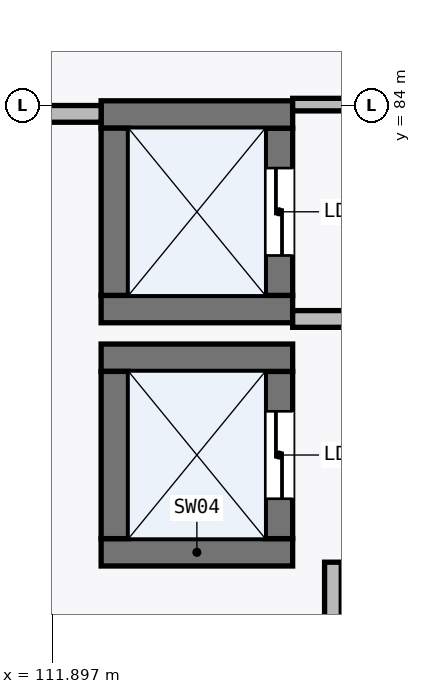
"""IFC4 building model, lengths in metres.
Left out: names, types, materials, properties, quantities, classifications, styles, units other than length and angle.
Written with IfcOpenShell. Run it as: python <this file> out.ifc"""

import sys

from ifc_helpers import new_model, si_unit, direction, frame, frame_2d, origin, place, context, subcontext, project, spatial, rectangle, extrude, element, fill, save


model = new_model("IFC4")
c1 = context("Model", 3, precision=1e-05, world=origin(), true_north=direction((0.0, 1.0)))
c2 = subcontext(c1, "Body", "Model", "MODEL_VIEW")
j1 = project(units=[si_unit("LENGTHUNIT", "METRE"), si_unit("PLANEANGLEUNIT", "RADIAN")], contexts=[c1])
p1 = place(None, origin())
s1 = spatial("IfcSite", under=j1, at=p1, CompositionType="ELEMENT")
p2 = place(p1, origin())
s2 = spatial("IfcBuilding", under=s1, at=p2, CompositionType="ELEMENT")
p3 = place(p2, frame((0.0, 0.0, -5.4)))
s3 = spatial("IfcBuildingStorey", under=s2, at=p3, CompositionType="ELEMENT", Elevation=-5.4)
p4 = place(p3, frame((112.54, 78.12, 0.0), z_axis=(0.0, 0.0, 1.0), x_axis=(1.0, 0.0, 0.0)))
e1 = element("IfcWall", 1, at=p4, inside=s3, PredefinedType="SHEAR", context=c2, shape_type="SweptSolid", body=[
    extrude(rectangle(XDim=2.52, YDim=0.36, at=frame_2d((1.26, 0.0))), origin(), (0.0, 0.0, 1.0), 5.145),
])
p5 = place(p3, frame((114.88, 78.3, 0.0), z_axis=(0.0, 0.0, 1.0), x_axis=(0.0, 1.0, 0.0)))
e2 = element("IfcWall", 2, at=p5, inside=s3, PredefinedType="SHEAR", context=c2, shape_type="SweptSolid", body=[
    extrude(rectangle(XDim=2.2, YDim=0.36, at=frame_2d((1.1, 0.0))), origin(), (0.0, 0.0, 1.0), 5.145),
])
p6 = place(p5, frame((0.525, 0.0, 0.0)))
e3 = element("IfcOpeningElement", 3, at=p6, cuts=e2, PredefinedType="OPENING", context=c2, shape_type="SweptSolid", body=[
    extrude(rectangle(XDim=1.15, YDim=2.2, at=frame_2d((0.575, 1.1))), frame((0.0, 0.19, 0.0), z_axis=(0.0, -1.0, 0.0), x_axis=(1.0, 0.0, 0.0)), (0.0, 0.0, 1.0), 0.38),
])
p7 = place(p3, frame((115.06, 80.68, 0.0), z_axis=(0.0, 0.0, 1.0), x_axis=(-1.0, 0.0, 0.0)))
e4 = element("IfcWall", 4, at=p7, inside=s3, PredefinedType="SHEAR", context=c2, shape_type="SweptSolid", body=[
    extrude(rectangle(XDim=2.52, YDim=0.36, at=frame_2d((1.26, 0.0))), origin(), (0.0, 0.0, 1.0), 5.145),
])
p8 = place(p3, frame((112.72, 80.5, 0.0), z_axis=(0.0, 0.0, 1.0), x_axis=(0.0, -1.0, 0.0)))
e5 = element("IfcWall", 5, at=p8, inside=s3, PredefinedType="SHEAR", context=c2, shape_type="SweptSolid", body=[
    extrude(rectangle(XDim=2.2, YDim=0.36, at=frame_2d((1.1, 0.0))), origin(), (0.0, 0.0, 1.0), 5.145),
])
p9 = place(p3, frame((112.54, 81.32, 0.0), z_axis=(0.0, 0.0, 1.0), x_axis=(1.0, 0.0, 0.0)))
e6 = element("IfcWall", 6, at=p9, inside=s3, PredefinedType="SHEAR", context=c2, shape_type="SweptSolid", body=[
    extrude(rectangle(XDim=2.52, YDim=0.36, at=frame_2d((1.26, 0.0))), origin(), (0.0, 0.0, 1.0), 5.145),
])
p10 = place(p3, frame((114.88, 81.5, 0.0), z_axis=(0.0, 0.0, 1.0), x_axis=(0.0, 1.0, 0.0)))
e7 = element("IfcWall", 7, at=p10, inside=s3, PredefinedType="SHEAR", context=c2, shape_type="SweptSolid", body=[
    extrude(rectangle(XDim=2.2, YDim=0.36, at=frame_2d((1.1, 0.0))), origin(), (0.0, 0.0, 1.0), 5.145),
])
p11 = place(p10, frame((0.525, 0.0, 0.0)))
e8 = element("IfcOpeningElement", 8, at=p11, cuts=e7, PredefinedType="OPENING", context=c2, shape_type="SweptSolid", body=[
    extrude(rectangle(XDim=1.15, YDim=2.2, at=frame_2d((0.575, 1.1))), frame((0.0, 0.19, 0.0), z_axis=(0.0, -1.0, 0.0), x_axis=(1.0, 0.0, 0.0)), (0.0, 0.0, 1.0), 0.38),
])
p12 = place(p3, frame((115.06, 83.88, 0.0), z_axis=(0.0, 0.0, 1.0), x_axis=(-1.0, 0.0, 0.0)))
e9 = element("IfcWall", 9, at=p12, inside=s3, PredefinedType="SHEAR", context=c2, shape_type="SweptSolid", body=[
    extrude(rectangle(XDim=2.52, YDim=0.36, at=frame_2d((1.26, 0.0))), origin(), (0.0, 0.0, 1.0), 5.145),
])
p13 = place(p3, frame((112.72, 83.7, 0.0), z_axis=(0.0, 0.0, 1.0), x_axis=(0.0, -1.0, 0.0)))
e10 = element("IfcWall", 10, at=p13, inside=s3, PredefinedType="SHEAR", context=c2, shape_type="SweptSolid", body=[
    extrude(rectangle(XDim=2.2, YDim=0.36, at=frame_2d((1.1, 0.0))), origin(), (0.0, 0.0, 1.0), 5.145),
])
p14 = place(p3, frame((112.54, 83.888, 0.0), z_axis=(0.0, 0.0, 1.0), x_axis=(-1.0, 0.0, 0.0)))
e11 = element("IfcWall", 11, at=p14, inside=s3, PredefinedType="PARTITIONING", context=c2, shape_type="SweptSolid", body=[
    extrude(rectangle(XDim=3.19, YDim=0.22, at=frame_2d((1.595, 0.0))), origin(), (0.0, 0.0, 1.0), 4.422),
])
p15 = place(p3, frame((115.59, 76.1, 0.0), z_axis=(0.0, 0.0, 1.0), x_axis=(0.0, 1.0, 0.0)))
e12 = element("IfcWall", 12, at=p15, inside=s3, PredefinedType="PARTITIONING", context=c2, shape_type="SweptSolid", body=[
    extrude(rectangle(XDim=1.89, YDim=0.22, at=frame_2d((0.945, 0.0))), origin(), (0.0, 0.0, 1.0), 5.145),
])
p16 = place(p3, frame((115.99, 81.19, 0.0), z_axis=(0.0, 0.0, 1.0), x_axis=(-1.0, 0.0, 0.0)))
e13 = element("IfcWall", 13, at=p16, inside=s3, PredefinedType="PARTITIONING", context=c2, shape_type="SweptSolid", body=[
    extrude(rectangle(XDim=0.93, YDim=0.22, at=frame_2d((0.465, 0.0))), origin(), (0.0, 0.0, 1.0), 5.145),
])
p17 = place(p3, frame((115.06, 84.01, 0.0), z_axis=(0.0, 0.0, 1.0), x_axis=(1.0, 0.0, 0.0)))
e14 = element("IfcWall", 14, at=p17, inside=s3, PredefinedType="PARTITIONING", context=c2, shape_type="SweptSolid", body=[
    extrude(rectangle(XDim=0.93, YDim=0.165, at=frame_2d((0.465, 0.0))), origin(), (0.0, 0.0, 1.0), 4.422),
])
p18 = place(p6, frame((1.15, 0.0, 0.0), z_axis=(0.0, 0.0, 1.0), x_axis=(-1.0, 0.0, 0.0)))
e15 = element("IfcDoor", 15, at=p18, inside=s3, OperationType="DOUBLE_DOOR_SLIDING", PredefinedType="DOOR", context=c2, shape_type="SweptSolid", body=[
    extrude(rectangle(XDim=1.15, YDim=2.2, at=frame_2d((0.575, 1.1))), frame((0.0, 0.025, 0.0), z_axis=(0.0, -1.0, 0.0), x_axis=(1.0, 0.0, 0.0)), (0.0, 0.0, 1.0), 0.05),
])
fill(e3, e15)
p19 = place(p11, frame((1.15, 0.0, 0.0), z_axis=(0.0, 0.0, 1.0), x_axis=(-1.0, 0.0, 0.0)))
e16 = element("IfcDoor", 16, at=p19, inside=s3, OperationType="DOUBLE_DOOR_SLIDING", PredefinedType="DOOR", context=c2, shape_type="SweptSolid", body=[
    extrude(rectangle(XDim=1.15, YDim=2.2, at=frame_2d((0.575, 1.1))), frame((0.0, 0.025, 0.0), z_axis=(0.0, -1.0, 0.0), x_axis=(1.0, 0.0, 0.0)), (0.0, 0.0, 1.0), 0.05),
])
fill(e8, e16)
save(model, sys.argv[1])
